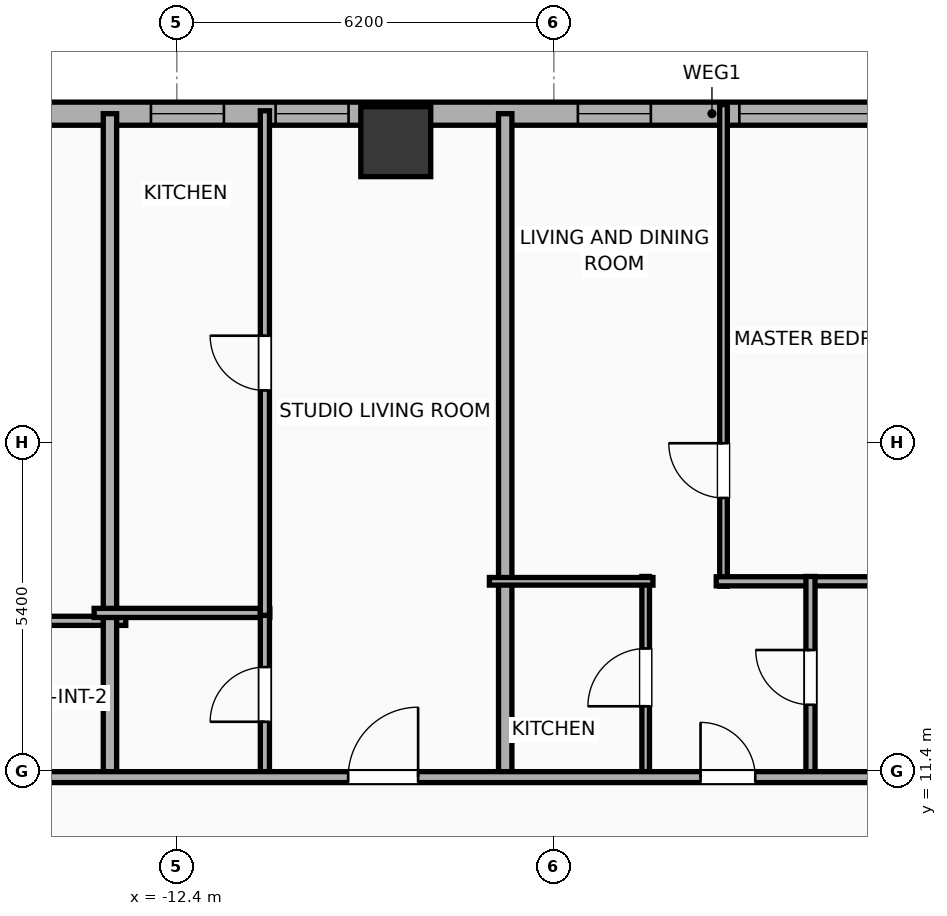
"""IFC4 building model, lengths in metres.
Left out: names, types, materials, properties, quantities, classifications, styles, units other than length and angle.
Written with IfcOpenShell. Run it as: python <this file> out.ifc"""

import sys

from ifc_helpers import new_model, si_unit, direction, frame, frame_2d, origin, origin_2d, place, context, subcontext, project, spatial, rectangle, hollow_rectangle, extrude, element, fill, save


model = new_model("IFC4")
c1 = context("Model", 3, precision=1e-05, world=origin(), true_north=direction((0.0, 1.0)))
c2 = subcontext(c1, "Body", "Model", "MODEL_VIEW")
j1 = project(units=[si_unit("LENGTHUNIT", "METRE"), si_unit("PLANEANGLEUNIT", "RADIAN")], contexts=[c1])
p1 = place(None, origin())
s1 = spatial("IfcSite", under=j1, at=p1, CompositionType="ELEMENT")
p2 = place(p1, origin())
s2 = spatial("IfcBuilding", under=s1, at=p2, CompositionType="ELEMENT")
p3 = place(p2, frame((0.0, 0.0, 49.4)))
s3 = spatial("IfcBuildingStorey", under=s2, at=p3, CompositionType="ELEMENT", Elevation=49.4)
p4 = place(p3, frame((-8.8, 21.75, 0.0), z_axis=(0.0, 0.0, 1.0), x_axis=(1.0, 0.0, 0.0)))
e1 = element("IfcColumn", 1, at=p4, inside=s3, PredefinedType="COLUMN", context=c2, shape_type="SweptSolid", body=[
    extrude(hollow_rectangle(XDim=1.15, YDim=1.15, WallThickness=0.04, at=origin_2d()), origin(), (0.0, 0.0, 1.0), 3.9),
])
p5 = place(p3, frame((-29.581, 22.21, 0.0), z_axis=(0.0, 0.0, 1.0), x_axis=(1.0, 0.0, 0.0)))
e2 = element("IfcWall", 2, at=p5, inside=s3, PredefinedType="ELEMENTEDWALL", context=c2, shape_type="SweptSolid", body=[
    extrude(rectangle(XDim=51.963, YDim=0.38, at=frame_2d((25.981, 0.0))), origin(), (0.0, 0.0, 1.0), 3.65),
])
p6 = place(p5, frame((6.61, 0.0, 0.75)))
e3 = element("IfcOpeningElement", 3, at=p6, cuts=e2, PredefinedType="OPENING", context=c2, shape_type="SweptSolid", body=[
    extrude(rectangle(XDim=2.4, YDim=2.1, at=frame_2d((1.2, 1.05))), frame((0.0, 0.2, 0.0), z_axis=(0.0, -1.0, 0.0), x_axis=(1.0, 0.0, 0.0)), (0.0, 0.0, 1.0), 0.4),
])
p7 = place(p5, frame((26.431, 0.0, 0.75)))
e4 = element("IfcOpeningElement", 4, at=p7, cuts=e2, PredefinedType="OPENING", context=c2, shape_type="SweptSolid", body=[
    extrude(rectangle(XDim=2.4, YDim=2.1, at=frame_2d((1.2, 1.05))), frame((0.0, 0.2, 0.0), z_axis=(0.0, -1.0, 0.0), x_axis=(1.0, 0.0, 0.0)), (0.0, 0.0, 1.0), 0.4),
])
p8 = place(p5, frame((43.752, 0.0, 0.75)))
e5 = element("IfcOpeningElement", 5, at=p8, cuts=e2, PredefinedType="OPENING", context=c2, shape_type="SweptSolid", body=[
    extrude(rectangle(XDim=2.4, YDim=2.1, at=frame_2d((1.2, 1.05))), frame((0.0, 0.2, 0.0), z_axis=(0.0, -1.0, 0.0), x_axis=(1.0, 0.0, 0.0)), (0.0, 0.0, 1.0), 0.4),
])
p9 = place(p5, frame((1.281, 0.0, 0.75)))
e6 = element("IfcOpeningElement", 6, at=p9, cuts=e2, PredefinedType="OPENING", context=c2, shape_type="SweptSolid", body=[
    extrude(rectangle(XDim=1.2, YDim=2.05, at=frame_2d((0.6, 1.025))), frame((0.0, 0.2, 0.0), z_axis=(0.0, -1.0, 0.0), x_axis=(1.0, 0.0, 0.0)), (0.0, 0.0, 1.0), 0.4),
])
p10 = place(p5, frame((3.922, 0.0, 0.75)))
e7 = element("IfcOpeningElement", 7, at=p10, cuts=e2, PredefinedType="OPENING", context=c2, shape_type="SweptSolid", body=[
    extrude(rectangle(XDim=1.2, YDim=2.05, at=frame_2d((0.6, 1.025))), frame((0.0, 0.2, 0.0), z_axis=(0.0, -1.0, 0.0), x_axis=(1.0, 0.0, 0.0)), (0.0, 0.0, 1.0), 0.4),
])
p11 = place(p5, frame((12.231, 0.0, 0.75)))
e8 = element("IfcOpeningElement", 8, at=p11, cuts=e2, PredefinedType="OPENING", context=c2, shape_type="SweptSolid", body=[
    extrude(rectangle(XDim=1.2, YDim=2.05, at=frame_2d((0.6, 1.025))), frame((0.0, 0.2, 0.0), z_axis=(0.0, -1.0, 0.0), x_axis=(1.0, 0.0, 0.0)), (0.0, 0.0, 1.0), 0.4),
])
p12 = place(p5, frame((18.805, 0.0, 0.75)))
e9 = element("IfcOpeningElement", 9, at=p12, cuts=e2, PredefinedType="OPENING", context=c2, shape_type="SweptSolid", body=[
    extrude(rectangle(XDim=1.2, YDim=2.05, at=frame_2d((0.6, 1.025))), frame((0.0, 0.2, 0.0), z_axis=(0.0, -1.0, 0.0), x_axis=(1.0, 0.0, 0.0)), (0.0, 0.0, 1.0), 0.4),
])
p13 = place(p5, frame((16.755, 0.0, 0.75)))
e10 = element("IfcOpeningElement", 10, at=p13, cuts=e2, PredefinedType="OPENING", context=c2, shape_type="SweptSolid", body=[
    extrude(rectangle(XDim=1.2, YDim=2.05, at=frame_2d((0.6, 1.025))), frame((0.0, 0.2, 0.0), z_axis=(0.0, -1.0, 0.0), x_axis=(1.0, 0.0, 0.0)), (0.0, 0.0, 1.0), 0.4),
])
p14 = place(p5, frame((23.776, 0.0, 0.75)))
e11 = element("IfcOpeningElement", 11, at=p14, cuts=e2, PredefinedType="OPENING", context=c2, shape_type="SweptSolid", body=[
    extrude(rectangle(XDim=1.2, YDim=2.05, at=frame_2d((0.6, 1.025))), frame((0.0, 0.2, 0.0), z_axis=(0.0, -1.0, 0.0), x_axis=(1.0, 0.0, 0.0)), (0.0, 0.0, 1.0), 0.4),
])
p15 = place(p5, frame((32.031, 0.0, 0.75)))
e12 = element("IfcOpeningElement", 12, at=p15, cuts=e2, PredefinedType="OPENING", context=c2, shape_type="SweptSolid", body=[
    extrude(rectangle(XDim=0.85, YDim=2.05, at=frame_2d((0.425, 1.025))), frame((0.0, 0.2, 0.0), z_axis=(0.0, -1.0, 0.0), x_axis=(1.0, 0.0, 0.0)), (0.0, 0.0, 1.0), 0.4),
])
p16 = place(p5, frame((34.276, 0.0, 0.75)))
e13 = element("IfcOpeningElement", 13, at=p16, cuts=e2, PredefinedType="OPENING", context=c2, shape_type="SweptSolid", body=[
    extrude(rectangle(XDim=1.2, YDim=2.05, at=frame_2d((0.6, 1.025))), frame((0.0, 0.2, 0.0), z_axis=(0.0, -1.0, 0.0), x_axis=(1.0, 0.0, 0.0)), (0.0, 0.0, 1.0), 0.4),
])
p17 = place(p5, frame((39.231, 0.0, 0.75)))
e14 = element("IfcOpeningElement", 14, at=p17, cuts=e2, PredefinedType="OPENING", context=c2, shape_type="SweptSolid", body=[
    extrude(rectangle(XDim=1.2, YDim=2.05, at=frame_2d((0.6, 1.025))), frame((0.0, 0.2, 0.0), z_axis=(0.0, -1.0, 0.0), x_axis=(1.0, 0.0, 0.0)), (0.0, 0.0, 1.0), 0.4),
])
p18 = place(p5, frame((47.676, 0.0, 0.75)))
e15 = element("IfcOpeningElement", 15, at=p18, cuts=e2, PredefinedType="OPENING", context=c2, shape_type="SweptSolid", body=[
    extrude(rectangle(XDim=1.2, YDim=2.05, at=frame_2d((0.6, 1.025))), frame((0.0, 0.2, 0.0), z_axis=(0.0, -1.0, 0.0), x_axis=(1.0, 0.0, 0.0)), (0.0, 0.0, 1.0), 0.4),
])
p19 = place(p5, frame((49.847, 0.0, 0.75)))
e16 = element("IfcOpeningElement", 16, at=p19, cuts=e2, PredefinedType="OPENING", context=c2, shape_type="SweptSolid", body=[
    extrude(rectangle(XDim=1.2, YDim=2.05, at=frame_2d((0.6, 1.025))), frame((0.0, 0.2, 0.0), z_axis=(0.0, -1.0, 0.0), x_axis=(1.0, 0.0, 0.0)), (0.0, 0.0, 1.0), 0.4),
])
p20 = place(p3, frame((-15.789, 13.87, 0.0), z_axis=(0.0, 0.0, 1.0), x_axis=(1.0, 0.0, 0.0)))
e17 = element("IfcWall", 17, at=p20, inside=s3, PredefinedType="PLUMBINGWALL", context=c2, shape_type="SweptSolid", body=[
    extrude(rectangle(XDim=2.549, YDim=0.15, at=frame_2d((1.274, 0.0))), origin(), (0.0, 0.0, 1.0), 3.65),
])
p21 = place(p3, frame((-13.5, 11.22, 0.0), z_axis=(0.0, 0.0, 1.0), x_axis=(0.0, 1.0, 0.0)))
e18 = element("IfcWall", 18, at=p21, inside=s3, PredefinedType="PARTITIONING", context=c2, shape_type="SweptSolid", body=[
    extrude(rectangle(XDim=10.99, YDim=0.22, at=frame_2d((5.495, 0.0))), origin(), (0.0, 0.0, 1.0), 3.65),
])
p22 = place(p3, frame((-13.76, 14.0, 0.0), z_axis=(0.0, 0.0, 1.0), x_axis=(1.0, 0.0, 0.0)))
e19 = element("IfcWall", 19, at=p22, inside=s3, PredefinedType="PLUMBINGWALL", context=c2, shape_type="SweptSolid", body=[
    extrude(rectangle(XDim=2.888, YDim=0.15, at=frame_2d((1.444, 0.0))), origin(), (0.0, 0.0, 1.0), 3.65),
])
p23 = place(p3, frame((-10.952, 11.28, 0.0), z_axis=(0.0, 0.0, 1.0), x_axis=(0.0, 1.0, 0.0)))
e20 = element("IfcWall", 20, at=p23, inside=s3, PredefinedType="PLUMBINGWALL", context=c2, shape_type="SweptSolid", body=[
    extrude(rectangle(XDim=2.76, YDim=0.15, at=frame_2d((1.38, 0.0))), origin(), (0.0, 0.0, 1.0), 2.94),
])
p24 = place(p23, frame((0.93, 0.0, 0.0)))
e21 = element("IfcOpeningElement", 21, at=p24, cuts=e20, PredefinedType="OPENING", context=c2, shape_type="SweptSolid", body=[
    extrude(rectangle(XDim=0.9, YDim=2.05, at=frame_2d((0.45, 1.025))), frame((0.0, 0.085, 0.0), z_axis=(0.0, -1.0, 0.0), x_axis=(1.0, 0.0, 0.0)), (0.0, 0.0, 1.0), 0.17),
])
p25 = place(p3, frame((-10.952, 13.96, 0.0), z_axis=(0.0, 0.0, 1.0), x_axis=(0.0, 1.0, 0.0)))
e22 = element("IfcWall", 22, at=p25, inside=s3, PredefinedType="PLUMBINGWALL", context=c2, shape_type="SweptSolid", body=[
    extrude(rectangle(XDim=8.298, YDim=0.15, at=frame_2d((4.149, 0.0))), origin(), (0.0, 0.0, 1.0), 3.65),
])
p26 = place(p25, frame((3.699, 0.0, 0.0)))
e23 = element("IfcOpeningElement", 23, at=p26, cuts=e22, PredefinedType="OPENING", context=c2, shape_type="SweptSolid", body=[
    extrude(rectangle(XDim=0.9, YDim=2.05, at=frame_2d((0.45, 1.025))), frame((0.0, 0.085, 0.0), z_axis=(0.0, -1.0, 0.0), x_axis=(1.0, 0.0, 0.0)), (0.0, 0.0, 1.0), 0.17),
])
p27 = place(p3, frame((-7.0, 11.22, 0.0), z_axis=(0.0, 0.0, 1.0), x_axis=(0.0, 1.0, 0.0)))
e24 = element("IfcWall", 24, at=p27, inside=s3, PredefinedType="PARTITIONING", context=c2, shape_type="SweptSolid", body=[
    extrude(rectangle(XDim=10.99, YDim=0.22, at=frame_2d((5.495, 0.0))), origin(), (0.0, 0.0, 1.0), 3.65),
])
p28 = place(p3, frame((-3.41, 14.44, 0.0), z_axis=(0.0, 0.0, 1.0), x_axis=(0.0, 1.0, 0.0)))
e25 = element("IfcWall", 25, at=p28, inside=s3, PredefinedType="PARTITIONING", context=c2, shape_type="SweptSolid", body=[
    extrude(rectangle(XDim=7.92, YDim=0.125, at=frame_2d((3.96, 0.0))), origin(), (0.0, 0.0, 1.0), 3.65),
])
p29 = place(p28, frame((1.451, 0.0, 0.0)))
e26 = element("IfcOpeningElement", 26, at=p29, cuts=e25, PredefinedType="OPENING", context=c2, shape_type="SweptSolid", body=[
    extrude(rectangle(XDim=0.9, YDim=2.05, at=frame_2d((0.45, 1.025))), frame((0.0, 0.073, 0.0), z_axis=(0.0, -1.0, 0.0), x_axis=(1.0, 0.0, 0.0)), (0.0, 0.0, 1.0), 0.145),
])
p30 = place(p3, frame((-3.53, 14.52, 0.0), z_axis=(0.0, 0.0, 1.0), x_axis=(1.0, 0.0, 0.0)))
e27 = element("IfcWall", 27, at=p30, inside=s3, PredefinedType="PLUMBINGWALL", context=c2, shape_type="SweptSolid", body=[
    extrude(rectangle(XDim=3.605, YDim=0.15, at=frame_2d((1.802, 0.0))), origin(), (0.0, 0.0, 1.0), 3.65),
])
p31 = place(p3, frame((-4.69, 11.28, 0.0), z_axis=(0.0, 0.0, 1.0), x_axis=(0.0, 1.0, 0.0)))
e28 = element("IfcWall", 28, at=p31, inside=s3, PredefinedType="PARTITIONING", context=c2, shape_type="SweptSolid", body=[
    extrude(rectangle(XDim=3.32, YDim=0.125, at=frame_2d((1.66, 0.0))), origin(), (0.0, 0.0, 1.0), 3.65),
])
p32 = place(p31, frame((1.185, 0.0, 0.0)))
e29 = element("IfcOpeningElement", 29, at=p32, cuts=e28, PredefinedType="OPENING", context=c2, shape_type="SweptSolid", body=[
    extrude(rectangle(XDim=0.95, YDim=2.05, at=frame_2d((0.475, 1.025))), frame((0.0, 0.073, 0.0), z_axis=(0.0, -1.0, 0.0), x_axis=(1.0, 0.0, 0.0)), (0.0, 0.0, 1.0), 0.145),
])
p33 = place(p3, frame((-7.26, 14.52, 0.0), z_axis=(0.0, 0.0, 1.0), x_axis=(1.0, 0.0, 0.0)))
e30 = element("IfcWall", 30, at=p33, inside=s3, PredefinedType="PARTITIONING", context=c2, shape_type="SweptSolid", body=[
    extrude(rectangle(XDim=2.69, YDim=0.125, at=frame_2d((1.345, 0.0))), origin(), (0.0, 0.0, 1.0), 3.65),
])
p34 = place(p3, frame((-1.98, 11.28, 0.0), z_axis=(0.0, 0.0, 1.0), x_axis=(0.0, 1.0, 0.0)))
e31 = element("IfcWall", 31, at=p34, inside=s3, PredefinedType="PLUMBINGWALL", context=c2, shape_type="SweptSolid", body=[
    extrude(rectangle(XDim=3.32, YDim=0.15, at=frame_2d((1.66, 0.0))), origin(), (0.0, 0.0, 1.0), 3.65),
])
p35 = place(p34, frame((1.21, 0.0, 0.0)))
e32 = element("IfcOpeningElement", 32, at=p35, cuts=e31, PredefinedType="OPENING", context=c2, shape_type="SweptSolid", body=[
    extrude(rectangle(XDim=0.9, YDim=2.05, at=frame_2d((0.45, 1.025))), frame((0.0, 0.085, 0.0), z_axis=(0.0, -1.0, 0.0), x_axis=(1.0, 0.0, 0.0)), (0.0, 0.0, 1.0), 0.17),
])
p36 = place(p3, frame((-33.41, 11.3, 0.0), z_axis=(0.0, 0.0, 1.0), x_axis=(1.0, 0.0, 0.0)))
e33 = element("IfcWall", 33, at=p36, inside=s3, PredefinedType="PARTITIONING", context=c2, shape_type="SweptSolid", body=[
    extrude(rectangle(XDim=59.62, YDim=0.18, at=frame_2d((29.81, 0.0))), origin(), (0.0, 0.0, 1.0), 3.65),
])
p37 = place(p36, frame((3.032, 0.0, 0.0)))
e34 = element("IfcOpeningElement", 34, at=p37, cuts=e33, PredefinedType="OPENING", context=c2, shape_type="SweptSolid", body=[
    extrude(rectangle(XDim=0.9, YDim=2.05, at=frame_2d((0.45, 1.025))), frame((0.0, 0.1, 0.0), z_axis=(0.0, -1.0, 0.0), x_axis=(1.0, 0.0, 0.0)), (0.0, 0.0, 1.0), 0.2),
])
p38 = place(p36, frame((9.769, 0.0, 0.0)))
e35 = element("IfcOpeningElement", 35, at=p38, cuts=e33, PredefinedType="OPENING", context=c2, shape_type="SweptSolid", body=[
    extrude(rectangle(XDim=0.9, YDim=2.05, at=frame_2d((0.45, 1.025))), frame((0.0, 0.1, 0.0), z_axis=(0.0, -1.0, 0.0), x_axis=(1.0, 0.0, 0.0)), (0.0, 0.0, 1.0), 0.2),
])
p39 = place(p36, frame((16.339, 0.0, 0.0)))
e36 = element("IfcOpeningElement", 36, at=p39, cuts=e33, PredefinedType="OPENING", context=c2, shape_type="SweptSolid", body=[
    extrude(rectangle(XDim=0.9, YDim=2.05, at=frame_2d((0.45, 1.025))), frame((0.0, 0.1, 0.0), z_axis=(0.0, -1.0, 0.0), x_axis=(1.0, 0.0, 0.0)), (0.0, 0.0, 1.0), 0.2),
])
p40 = place(p36, frame((23.827, 0.0, 0.0)))
e37 = element("IfcOpeningElement", 37, at=p40, cuts=e33, PredefinedType="OPENING", context=c2, shape_type="SweptSolid", body=[
    extrude(rectangle(XDim=1.15, YDim=2.05, at=frame_2d((0.575, 1.025))), frame((0.0, 0.1, 0.0), z_axis=(0.0, -1.0, 0.0), x_axis=(1.0, 0.0, 0.0)), (0.0, 0.0, 1.0), 0.2),
])
p41 = place(p36, frame((29.622, 0.0, 0.0)))
e38 = element("IfcOpeningElement", 38, at=p41, cuts=e33, PredefinedType="OPENING", context=c2, shape_type="SweptSolid", body=[
    extrude(rectangle(XDim=0.9, YDim=2.05, at=frame_2d((0.45, 1.025))), frame((0.0, 0.1, 0.0), z_axis=(0.0, -1.0, 0.0), x_axis=(1.0, 0.0, 0.0)), (0.0, 0.0, 1.0), 0.2),
])
p42 = place(p36, frame((36.628, 0.0, 0.0)))
e39 = element("IfcOpeningElement", 39, at=p42, cuts=e33, PredefinedType="OPENING", context=c2, shape_type="SweptSolid", body=[
    extrude(rectangle(XDim=0.9, YDim=2.05, at=frame_2d((0.45, 1.025))), frame((0.0, 0.1, 0.0), z_axis=(0.0, -1.0, 0.0), x_axis=(1.0, 0.0, 0.0)), (0.0, 0.0, 1.0), 0.2),
])
p43 = place(p36, frame((43.335, 0.0, 0.0)))
e40 = element("IfcOpeningElement", 40, at=p43, cuts=e33, PredefinedType="OPENING", context=c2, shape_type="SweptSolid", body=[
    extrude(rectangle(XDim=0.9, YDim=2.05, at=frame_2d((0.45, 1.025))), frame((0.0, 0.1, 0.0), z_axis=(0.0, -1.0, 0.0), x_axis=(1.0, 0.0, 0.0)), (0.0, 0.0, 1.0), 0.2),
])
p44 = place(p36, frame((48.307, 0.0, 0.0)))
e41 = element("IfcOpeningElement", 41, at=p44, cuts=e33, PredefinedType="OPENING", context=c2, shape_type="SweptSolid", body=[
    extrude(rectangle(XDim=1.15, YDim=2.05, at=frame_2d((0.575, 1.025))), frame((0.0, 0.1, 0.0), z_axis=(0.0, -1.0, 0.0), x_axis=(1.0, 0.0, 0.0)), (0.0, 0.0, 1.0), 0.2),
])
p45 = place(p36, frame((56.225, 0.0, 0.0)))
e42 = element("IfcOpeningElement", 42, at=p45, cuts=e33, PredefinedType="OPENING", context=c2, shape_type="SweptSolid", body=[
    extrude(rectangle(XDim=0.9, YDim=2.05, at=frame_2d((0.45, 1.025))), frame((0.0, 0.1, 0.0), z_axis=(0.0, -1.0, 0.0), x_axis=(1.0, 0.0, 0.0)), (0.0, 0.0, 1.0), 0.2),
])
p46 = place(p7, origin())
e43 = element("IfcWindow", 43, at=p46, inside=s3, PartitioningType="SINGLE_PANEL", PredefinedType="WINDOW", context=c2, shape_type="SweptSolid", body=[
    extrude(rectangle(XDim=2.4, YDim=2.1, at=frame_2d((1.2, 1.05))), frame((0.0, 0.03, 0.0), z_axis=(0.0, -1.0, 0.0), x_axis=(1.0, 0.0, 0.0)), (0.0, 0.0, 1.0), 0.06),
])
fill(e4, e43)
p47 = place(p12, origin())
e44 = element("IfcWindow", 44, at=p47, inside=s3, PartitioningType="SINGLE_PANEL", PredefinedType="WINDOW", context=c2, shape_type="SweptSolid", body=[
    extrude(rectangle(XDim=1.2, YDim=2.05, at=frame_2d((0.6, 1.025))), frame((0.0, 0.03, 0.0), z_axis=(0.0, -1.0, 0.0), x_axis=(1.0, 0.0, 0.0)), (0.0, 0.0, 1.0), 0.06),
])
fill(e9, e44)
p48 = place(p13, origin())
e45 = element("IfcWindow", 45, at=p48, inside=s3, PartitioningType="SINGLE_PANEL", PredefinedType="WINDOW", context=c2, shape_type="SweptSolid", body=[
    extrude(rectangle(XDim=1.2, YDim=2.05, at=frame_2d((0.6, 1.025))), frame((0.0, 0.03, 0.0), z_axis=(0.0, -1.0, 0.0), x_axis=(1.0, 0.0, 0.0)), (0.0, 0.0, 1.0), 0.06),
])
fill(e10, e45)
p49 = place(p14, origin())
e46 = element("IfcWindow", 46, at=p49, inside=s3, PartitioningType="SINGLE_PANEL", PredefinedType="WINDOW", context=c2, shape_type="SweptSolid", body=[
    extrude(rectangle(XDim=1.2, YDim=2.05, at=frame_2d((0.6, 1.025))), frame((0.0, 0.03, 0.0), z_axis=(0.0, -1.0, 0.0), x_axis=(1.0, 0.0, 0.0)), (0.0, 0.0, 1.0), 0.06),
])
fill(e11, e46)
p50 = place(p24, origin())
e47 = element("IfcDoor", 47, at=p50, inside=s3, OperationType="SINGLE_SWING_LEFT", PredefinedType="DOOR", context=c2, shape_type="SweptSolid", body=[
    extrude(rectangle(XDim=0.9, YDim=2.05, at=frame_2d((0.45, 1.025))), frame((0.0, 0.025, 0.0), z_axis=(0.0, -1.0, 0.0), x_axis=(1.0, 0.0, 0.0)), (0.0, 0.0, 1.0), 0.05),
])
fill(e21, e47)
p51 = place(p26, origin())
e48 = element("IfcDoor", 48, at=p51, inside=s3, OperationType="SINGLE_SWING_RIGHT", PredefinedType="DOOR", context=c2, shape_type="SweptSolid", body=[
    extrude(rectangle(XDim=0.9, YDim=2.05, at=frame_2d((0.45, 1.025))), frame((0.0, 0.025, 0.0), z_axis=(0.0, -1.0, 0.0), x_axis=(1.0, 0.0, 0.0)), (0.0, 0.0, 1.0), 0.05),
])
fill(e23, e48)
p52 = place(p29, origin())
e49 = element("IfcDoor", 49, at=p52, inside=s3, OperationType="SINGLE_SWING_RIGHT", PredefinedType="DOOR", context=c2, shape_type="SweptSolid", body=[
    extrude(rectangle(XDim=0.9, YDim=2.05, at=frame_2d((0.45, 1.025))), frame((0.0, 0.025, 0.0), z_axis=(0.0, -1.0, 0.0), x_axis=(1.0, 0.0, 0.0)), (0.0, 0.0, 1.0), 0.05),
])
fill(e26, e49)
p53 = place(p32, origin())
e50 = element("IfcDoor", 50, at=p53, inside=s3, OperationType="SINGLE_SWING_LEFT", PredefinedType="DOOR", context=c2, shape_type="SweptSolid", body=[
    extrude(rectangle(XDim=0.95, YDim=2.05, at=frame_2d((0.475, 1.025))), frame((0.0, 0.025, 0.0), z_axis=(0.0, -1.0, 0.0), x_axis=(1.0, 0.0, 0.0)), (0.0, 0.0, 1.0), 0.05),
])
fill(e29, e50)
p54 = place(p35, origin())
e51 = element("IfcDoor", 51, at=p54, inside=s3, OperationType="SINGLE_SWING_RIGHT", PredefinedType="DOOR", context=c2, shape_type="SweptSolid", body=[
    extrude(rectangle(XDim=0.9, YDim=2.05, at=frame_2d((0.45, 1.025))), frame((0.0, 0.025, 0.0), z_axis=(0.0, -1.0, 0.0), x_axis=(1.0, 0.0, 0.0)), (0.0, 0.0, 1.0), 0.05),
])
fill(e32, e51)
p55 = place(p40, origin())
e52 = element("IfcDoor", 52, at=p55, inside=s3, OperationType="SINGLE_SWING_RIGHT", PredefinedType="DOOR", context=c2, shape_type="SweptSolid", body=[
    extrude(rectangle(XDim=1.15, YDim=2.05, at=frame_2d((0.575, 1.025))), frame((0.0, 0.025, 0.0), z_axis=(0.0, -1.0, 0.0), x_axis=(1.0, 0.0, 0.0)), (0.0, 0.0, 1.0), 0.05),
])
fill(e37, e52)
p56 = place(p41, origin())
e53 = element("IfcDoor", 53, at=p56, inside=s3, OperationType="SINGLE_SWING_LEFT", PredefinedType="DOOR", context=c2, shape_type="SweptSolid", body=[
    extrude(rectangle(XDim=0.9, YDim=2.05, at=frame_2d((0.45, 1.025))), frame((0.0, 0.025, 0.0), z_axis=(0.0, -1.0, 0.0), x_axis=(1.0, 0.0, 0.0)), (0.0, 0.0, 1.0), 0.05),
])
fill(e38, e53)
save(model, sys.argv[1])
